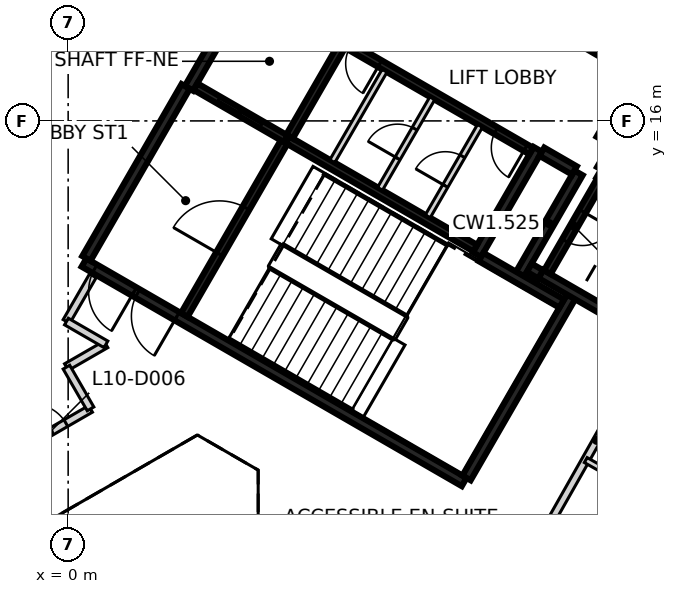
"""IFC4 building model, lengths in metres.
Left out: names, types, materials, properties, quantities, classifications, styles, units other than length and angle.
Written with IfcOpenShell. Run it as: python <this file> out.ifc"""

import sys

from ifc_helpers import new_model, si_unit, direction, frame, frame_2d, origin, place, context, subcontext, project, spatial, rectangle, extrude, element, fill, save


model = new_model("IFC4")
c1 = context("Model", 3, precision=1e-05, world=origin(), true_north=direction((0.0, 1.0)))
c2 = subcontext(c1, "Body", "Model", "MODEL_VIEW")
j1 = project(units=[si_unit("LENGTHUNIT", "METRE"), si_unit("PLANEANGLEUNIT", "RADIAN")], contexts=[c1])
p1 = place(None, origin())
s1 = spatial("IfcSite", under=j1, at=p1, CompositionType="ELEMENT")
p2 = place(p1, origin())
s2 = spatial("IfcBuilding", under=s1, at=p2, CompositionType="ELEMENT")
p3 = place(p2, frame((0.0, 0.0, 49.4)))
s3 = spatial("IfcBuildingStorey", under=s2, at=p3, CompositionType="ELEMENT", Elevation=49.4)
p4 = place(p3, frame((10.42, 6.498, 0.0), z_axis=(0.0, 0.0, 1.0), x_axis=(-0.866021906294, 0.500006057782, 0.0)))
e1 = element("IfcWall", 1, at=p4, inside=s3, PredefinedType="SHEAR", context=c2, shape_type="SweptSolid", body=[
    extrude(rectangle(XDim=11.55, YDim=0.25, at=frame_2d((5.775, 0.0))), origin(), (0.0, 0.0, 1.0), 3.125),
])
p5 = place(p4, frame((10.025, 0.0, 0.0)))
e2 = element("IfcOpeningElement", 2, at=p5, cuts=e1, PredefinedType="OPENING", context=c2, shape_type="SweptSolid", body=[
    extrude(rectangle(XDim=1.2, YDim=2.1, at=frame_2d((0.6, 1.05))), frame((0.0, 0.135, 0.0), z_axis=(0.0, -1.0, 0.0), x_axis=(1.0, 0.0, 0.0)), (0.0, 0.0, 1.0), 0.27),
])
p6 = place(p4, frame((8.725, 0.0, 0.0)))
e3 = element("IfcOpeningElement", 3, at=p6, cuts=e1, PredefinedType="OPENING", context=c2, shape_type="SweptSolid", body=[
    extrude(rectangle(XDim=1.2, YDim=2.1, at=frame_2d((0.6, 1.05))), frame((0.0, 0.135, 0.0), z_axis=(0.0, -1.0, 0.0), x_axis=(1.0, 0.0, 0.0)), (0.0, 0.0, 1.0), 0.27),
])
p7 = place(p3, frame((3.179, 16.856, 0.0), z_axis=(0.0, 0.0, 1.0), x_axis=(0.500004234368, 0.866022959057, 0.0)))
e4 = element("IfcWall", 4, at=p7, inside=s3, PredefinedType="SHEAR", context=c2, shape_type="SweptSolid", body=[
    extrude(rectangle(XDim=6.25, YDim=0.25, at=frame_2d((3.125, 0.0))), origin(), (0.0, 0.0, 1.0), 3.125),
])
p8 = place(p3, frame((0.48, 12.381, 0.0), z_axis=(0.0, 0.0, 1.0), x_axis=(0.49999885962, 0.866026062182, 0.0)))
e5 = element("IfcWall", 5, at=p8, inside=s3, PredefinedType="SHEAR", context=c2, shape_type="SweptSolid", body=[
    extrude(rectangle(XDim=5.225, YDim=0.25, at=frame_2d((2.612, 0.0))), origin(), (0.0, 0.0, 1.0), 3.125),
])
p9 = place(p3, frame((13.238, 11.378, 0.0), z_axis=(0.0, 0.0, 1.0), x_axis=(-0.500008851346, -0.866020293397, 0.0)))
e6 = element("IfcWall", 6, at=p9, inside=s3, PredefinedType="SHEAR", context=c2, shape_type="SweptSolid", body=[
    extrude(rectangle(XDim=5.51, YDim=0.25, at=frame_2d((2.755, 0.0))), origin(), (0.0, 0.0, 1.0), 3.125),
])
p10 = place(p3, frame((12.357, 15.252, 0.0), z_axis=(0.0, 0.0, 1.0), x_axis=(-0.500028443584, -0.866008981251, 0.0)))
e7 = element("IfcWall", 7, at=p10, inside=s3, PredefinedType="SHEAR", context=c2, shape_type="SweptSolid", body=[
    extrude(rectangle(XDim=3.2, YDim=0.25, at=frame_2d((1.6, 0.0))), origin(), (0.0, 0.0, 1.0), 3.125),
])
p11 = place(p3, frame((14.918, 10.54, 0.0), z_axis=(0.0, 0.0, 1.0), x_axis=(-0.866063538972, 0.499933942099, 0.0)))
e8 = element("IfcWall", 8, at=p11, inside=s3, PredefinedType="SHEAR", context=c2, shape_type="SweptSolid", body=[
    extrude(rectangle(XDim=2.865, YDim=0.25, at=frame_2d((1.432, 0.0))), origin(), (0.0, 0.0, 1.0), 3.125),
])
p12 = place(p3, frame((13.963, 14.614, 0.0), z_axis=(0.0, 0.0, 1.0), x_axis=(0.866042235819, -0.499970844928, 0.0)))
e9 = element("IfcWall", 9, at=p12, inside=s3, PredefinedType="SHEAR", context=c2, shape_type="SweptSolid", body=[
    extrude(rectangle(XDim=2.865, YDim=0.25, at=frame_2d((1.432, 0.0))), origin(), (0.0, 0.0, 1.0), 3.125),
])
p13 = place(p3, frame((11.888, 11.961, 0.0), z_axis=(0.0, 0.0, 1.0), x_axis=(0.500003324108, 0.866023484601, 0.0)))
e10 = element("IfcWall", 10, at=p13, inside=s3, PredefinedType="SHEAR", context=c2, shape_type="SweptSolid", body=[
    extrude(rectangle(XDim=3.085, YDim=0.25, at=frame_2d((1.542, 0.0))), origin(), (0.0, 0.0, 1.0), 3.125),
])
p14 = place(p3, frame((10.865, 12.418, 0.0), z_axis=(0.0, 0.0, 1.0), x_axis=(0.866026229868, -0.499998569178, 0.0)))
e11 = element("IfcWall", 11, at=p14, inside=s3, PredefinedType="SHEAR", context=c2, shape_type="SweptSolid", body=[
    extrude(rectangle(XDim=2.449, YDim=0.25, at=frame_2d((1.225, 0.0))), origin(), (0.0, 0.0, 1.0), 3.125),
])
p15 = place(p3, frame((13.297, 18.231, 0.0), z_axis=(0.0, 0.0, 1.0), x_axis=(0.866043531843, -0.499968599967, 0.0)))
e12 = element("IfcWall", 12, at=p15, inside=s3, PredefinedType="SHEAR", context=c2, shape_type="SweptSolid", body=[
    extrude(rectangle(XDim=1.975, YDim=0.25, at=frame_2d((0.987, 0.0))), origin(), (0.0, 0.0, 1.0), 3.125),
])
p16 = place(p3, frame((14.945, 17.135, 0.0), z_axis=(0.0, 0.0, 1.0), x_axis=(-0.499983108224, -0.866035156036, 0.0)))
e13 = element("IfcWall", 13, at=p16, inside=s3, PredefinedType="SHEAR", context=c2, shape_type="SweptSolid", body=[
    extrude(rectangle(XDim=1.865, YDim=0.25, at=frame_2d((0.932, 0.0))), origin(), (0.0, 0.0, 1.0), 3.125),
])
p17 = place(p16, frame((0.535, 0.0, 0.0)))
e14 = element("IfcOpeningElement", 14, at=p17, cuts=e13, PredefinedType="OPENING", context=c2, shape_type="SweptSolid", body=[
    extrude(rectangle(XDim=1.25, YDim=2.1, at=frame_2d((0.625, 1.05))), frame((0.0, 0.135, 0.0), z_axis=(0.0, -1.0, 0.0), x_axis=(1.0, 0.0, 0.0)), (0.0, 0.0, 1.0), 0.27),
])
p18 = place(p3, frame((13.322, 14.695, 0.0), z_axis=(0.0, 0.0, 1.0), x_axis=(-0.866017078145, 0.500014420154, 0.0)))
e15 = element("IfcWall", 15, at=p18, inside=s3, PredefinedType="SHEAR", context=c2, shape_type="SweptSolid", body=[
    extrude(rectangle(XDim=0.989, YDim=0.25, at=frame_2d((0.495, 0.0))), origin(), (0.0, 0.0, 1.0), 3.125),
])
p19 = place(p3, frame((14.368, 15.315, 0.0), z_axis=(0.0, 0.0, 1.0), x_axis=(-0.499897359611, -0.866084655132, 0.0)))
e16 = element("IfcWall", 16, at=p19, inside=s3, PredefinedType="SHEAR", context=c2, shape_type="SweptSolid", body=[
    extrude(rectangle(XDim=0.685, YDim=0.25, at=frame_2d((0.342, 0.0))), origin(), (0.0, 0.0, 1.0), 3.125),
])
p20 = place(p3, frame((12.433, 11.964, 0.0), z_axis=(0.0, 0.0, 1.0), x_axis=(-0.866055875208, 0.499947218231, 0.0)))
e17 = element("IfcWall", 17, at=p20, inside=s3, PredefinedType="SHEAR", context=c2, shape_type="SweptSolid", body=[
    extrude(rectangle(XDim=0.345, YDim=0.25, at=frame_2d((0.172, 0.0))), origin(), (0.0, 0.0, 1.0), 3.125),
])
p21 = place(p3, frame((5.775, 15.502, 0.0), z_axis=(0.0, 0.0, 1.0), x_axis=(0.866020080793, -0.500009219579, 0.0)))
e18 = element("IfcWall", 18, at=p21, inside=s3, PredefinedType="SHEAR", context=c2, shape_type="SweptSolid", body=[
    extrude(rectangle(XDim=5.699, YDim=0.2, at=frame_2d((2.85, 0.0))), origin(), (0.0, 0.0, 1.0), 3.125),
])
p22 = place(p3, frame((12.185, 15.207, 0.0), z_axis=(0.0, 0.0, 1.0), x_axis=(-0.866020080793, 0.500009219579, 0.0)))
e19 = element("IfcWall", 19, at=p22, inside=s3, PredefinedType="SHEAR", context=c2, shape_type="SweptSolid", body=[
    extrude(rectangle(XDim=5.699, YDim=0.2, at=frame_2d((2.85, 0.0))), origin(), (0.0, 0.0, 1.0), 3.125),
])
p23 = place(p22, frame((0.174, 0.0, 0.0)))
e20 = element("IfcOpeningElement", 20, at=p23, cuts=e19, PredefinedType="OPENING", context=c2, shape_type="SweptSolid", body=[
    extrude(rectangle(XDim=0.9, YDim=2.1, at=frame_2d((0.45, 1.05))), frame((0.0, 0.11, 0.0), z_axis=(0.0, -1.0, 0.0), x_axis=(1.0, 0.0, 0.0)), (0.0, 0.0, 1.0), 0.22),
])
p24 = place(p22, frame((4.599, 0.0, 0.0)))
e21 = element("IfcOpeningElement", 21, at=p24, cuts=e19, PredefinedType="OPENING", context=c2, shape_type="SweptSolid", body=[
    extrude(rectangle(XDim=0.9, YDim=2.1, at=frame_2d((0.45, 1.05))), frame((0.0, 0.11, 0.0), z_axis=(0.0, -1.0, 0.0), x_axis=(1.0, 0.0, 0.0)), (0.0, 0.0, 1.0), 0.22),
])
p25 = place(p3, frame((3.057, 10.895, 0.0), z_axis=(0.0, 0.0, 1.0), x_axis=(0.499989418164, 0.866031513124, 0.0)))
e22 = element("IfcWall", 22, at=p25, inside=s3, PredefinedType="SHEAR", context=c2, shape_type="SweptSolid", body=[
    extrude(rectangle(XDim=5.251, YDim=0.2, at=frame_2d((2.625, 0.0))), origin(), (0.0, 0.0, 1.0), 3.125),
])
p26 = place(p25, frame((1.849, 0.0, 0.0)))
e23 = element("IfcOpeningElement", 23, at=p26, cuts=e22, PredefinedType="OPENING", context=c2, shape_type="SweptSolid", body=[
    extrude(rectangle(XDim=1.4, YDim=2.1, at=frame_2d((0.7, 1.05))), frame((0.0, 0.11, 0.0), z_axis=(0.0, -1.0, 0.0), x_axis=(1.0, 0.0, 0.0)), (0.0, 0.0, 1.0), 0.22),
])
p27 = place(p3, frame((14.008, 14.442, 0.0), z_axis=(0.0, 0.0, 1.0), x_axis=(-0.499986818241, -0.866033014143, 0.0)))
e24 = element("IfcWall", 24, at=p27, inside=s3, PredefinedType="SHEAR", context=c2, shape_type="SweptSolid", body=[
    extrude(rectangle(XDim=2.798, YDim=0.2, at=frame_2d((1.399, 0.0))), origin(), (0.0, 0.0, 1.0), 3.125),
])
p28 = place(p27, frame((0.949, 0.0, 0.0)))
e25 = element("IfcOpeningElement", 25, at=p28, cuts=e24, PredefinedType="OPENING", context=c2, shape_type="SweptSolid", body=[
    extrude(rectangle(XDim=0.9, YDim=2.1, at=frame_2d((0.45, 1.05))), frame((0.0, 0.11, 0.0), z_axis=(0.0, -1.0, 0.0), x_axis=(1.0, 0.0, 0.0)), (0.0, 0.0, 1.0), 0.22),
])
p29 = place(p3, frame((7.199, 17.97, 0.0), z_axis=(0.0, 0.0, 1.0), x_axis=(-0.499968400327, -0.866043647095, 0.0)))
e26 = element("IfcWall", 26, at=p29, inside=s3, PredefinedType="SHEAR", context=c2, shape_type="SweptSolid", body=[
    extrude(rectangle(XDim=2.75, YDim=0.2, at=frame_2d((1.375, 0.0))), origin(), (0.0, 0.0, 1.0), 3.125),
])
p30 = place(p3, frame((5.725, 15.531, 0.0), z_axis=(0.0, 0.0, 1.0), x_axis=(-0.866037306777, 0.499979382845, 0.0)))
e27 = element("IfcWall", 27, at=p30, inside=s3, PredefinedType="SHEAR", context=c2, shape_type="SweptSolid", body=[
    extrude(rectangle(XDim=2.742, YDim=0.2, at=frame_2d((1.371, 0.0))), origin(), (0.0, 0.0, 1.0), 3.125),
])
p31 = place(p30, frame((0.743, 0.0, 0.0)))
e28 = element("IfcOpeningElement", 28, at=p31, cuts=e27, PredefinedType="OPENING", context=c2, shape_type="SweptSolid", body=[
    extrude(rectangle(XDim=1.3, YDim=2.1, at=frame_2d((0.65, 1.05))), frame((0.0, 0.11, 0.0), z_axis=(0.0, -1.0, 0.0), x_axis=(1.0, 0.0, 0.0)), (0.0, 0.0, 1.0), 0.22),
])
p32 = place(p3, frame((9.462, 13.489, 0.0), z_axis=(0.0, 0.0, 1.0), x_axis=(0.50002746344, 0.86600954718, 0.0)))
e29 = element("IfcWall", 29, at=p32, inside=s3, PredefinedType="PARTITIONING", context=c2, shape_type="SweptSolid", body=[
    extrude(rectangle(XDim=2.748, YDim=0.15, at=frame_2d((1.374, 0.0))), origin(), (0.0, 0.0, 1.0), 3.125),
])
p33 = place(p32, frame((0.924, 0.0, 0.0)))
e30 = element("IfcOpeningElement", 30, at=p33, cuts=e29, PredefinedType="OPENING", context=c2, shape_type="SweptSolid", body=[
    extrude(rectangle(XDim=0.9, YDim=2.1, at=frame_2d((0.45, 1.05))), frame((0.0, 0.085, 0.0), z_axis=(0.0, -1.0, 0.0), x_axis=(1.0, 0.0, 0.0)), (0.0, 0.0, 1.0), 0.17),
])
p34 = place(p3, frame((8.207, 14.214, 0.0), z_axis=(0.0, 0.0, 1.0), x_axis=(0.499922376475, 0.866070215109, 0.0)))
e31 = element("IfcWall", 31, at=p34, inside=s3, PredefinedType="PARTITIONING", context=c2, shape_type="SweptSolid", body=[
    extrude(rectangle(XDim=2.749, YDim=0.15, at=frame_2d((1.374, 0.0))), origin(), (0.0, 0.0, 1.0), 3.125),
])
p35 = place(p34, frame((0.924, 0.0, 0.0)))
e32 = element("IfcOpeningElement", 32, at=p35, cuts=e31, PredefinedType="OPENING", context=c2, shape_type="SweptSolid", body=[
    extrude(rectangle(XDim=0.9, YDim=2.1, at=frame_2d((0.45, 1.05))), frame((0.0, 0.085, 0.0), z_axis=(0.0, -1.0, 0.0), x_axis=(1.0, 0.0, 0.0)), (0.0, 0.0, 1.0), 0.17),
])
p36 = place(p3, frame((6.951, 14.939, 0.0), z_axis=(0.0, 0.0, 1.0), x_axis=(0.50002746344, 0.86600954718, 0.0)))
e33 = element("IfcWall", 33, at=p36, inside=s3, PredefinedType="PARTITIONING", context=c2, shape_type="SweptSolid", body=[
    extrude(rectangle(XDim=2.748, YDim=0.15, at=frame_2d((1.374, 0.0))), origin(), (0.0, 0.0, 1.0), 3.125),
])
p37 = place(p3, frame((-5.446, 4.94, 0.0), z_axis=(0.0, 0.0, 1.0), x_axis=(0.866096332545, 0.499877127655, 0.0)))
e34 = element("IfcWall", 34, at=p37, inside=s3, PredefinedType="PARTITIONING", context=c2, shape_type="SweptSolid", body=[
    extrude(rectangle(XDim=6.969, YDim=0.2, at=frame_2d((3.484, 0.0))), origin(), (0.0, 0.0, 1.0), 3.125),
])
p38 = place(p37, frame((5.219, 0.0, 0.0)))
e35 = element("IfcOpeningElement", 35, at=p38, cuts=e34, PredefinedType="OPENING", context=c2, shape_type="SweptSolid", body=[
    extrude(rectangle(XDim=1.0, YDim=2.1, at=frame_2d((0.5, 1.05))), frame((0.0, 0.11, 0.0), z_axis=(0.0, -1.0, 0.0), x_axis=(1.0, 0.0, 0.0)), (0.0, 0.0, 1.0), 0.22),
])
p39 = place(p37, frame((3.344, 0.0, 0.0)))
e36 = element("IfcOpeningElement", 36, at=p39, cuts=e34, PredefinedType="OPENING", context=c2, shape_type="SweptSolid", body=[
    extrude(rectangle(XDim=0.95, YDim=2.1, at=frame_2d((0.475, 1.05))), frame((0.0, 0.11, 0.0), z_axis=(0.0, -1.0, 0.0), x_axis=(1.0, 0.0, 0.0)), (0.0, 0.0, 1.0), 0.22),
])
p40 = place(p3, frame((-0.045, 9.522, 0.0), z_axis=(0.0, 0.0, 1.0), x_axis=(0.86625675314, 0.499599076899, 0.0)))
e37 = element("IfcWall", 37, at=p40, inside=s3, PredefinedType="PARTITIONING", context=c2, shape_type="SweptSolid", body=[
    extrude(rectangle(XDim=1.199, YDim=0.2, at=frame_2d((0.6, 0.0))), origin(), (0.0, 0.0, 1.0), 3.125),
])
p41 = place(p3, frame((-0.045, 10.722, 0.0), z_axis=(0.0, 0.0, 1.0), x_axis=(0.500107785535, 0.865963164833, 0.0)))
e38 = element("IfcWall", 38, at=p41, inside=s3, PredefinedType="PARTITIONING", context=c2, shape_type="SweptSolid", body=[
    extrude(rectangle(XDim=1.389, YDim=0.2, at=frame_2d((0.695, 0.0))), origin(), (0.0, 0.0, 1.0), 3.125),
])
p42 = place(p3, frame((-0.045, 9.521, 0.0), z_axis=(0.0, 0.0, 1.0), x_axis=(0.500094716449, -0.865970712311, 0.0)))
e39 = element("IfcWall", 39, at=p42, inside=s3, PredefinedType="PARTITIONING", context=c2, shape_type="SweptSolid", body=[
    extrude(rectangle(XDim=1.268, YDim=0.2, at=frame_2d((0.634, 0.0))), origin(), (0.0, 0.0, 1.0), 3.125),
])
p43 = place(p3, frame((-0.045, 10.721, 0.0), z_axis=(0.0, 0.0, 1.0), x_axis=(0.865992388649, -0.500057179532, 0.0)))
e40 = element("IfcWall", 40, at=p43, inside=s3, PredefinedType="PARTITIONING", context=c2, shape_type="SweptSolid", body=[
    extrude(rectangle(XDim=1.199, YDim=0.2, at=frame_2d((0.6, 0.0))), origin(), (0.0, 0.0, 1.0), 3.125),
])
p44 = place(p3, frame((12.432, 4.992, 0.0), z_axis=(0.0, 0.0, 1.0), x_axis=(0.492790102015, 0.870148214591, 0.0)))
e41 = element("IfcWall", 41, at=p44, inside=s3, PredefinedType="PARTITIONING", context=c2, shape_type="SweptSolid", body=[
    extrude(rectangle(XDim=5.981, YDim=0.2, at=frame_2d((2.991, 0.0))), origin(), (0.0, 0.0, 1.0), 3.125),
])
p45 = place(p3, frame((13.619, 7.076, 0.0), z_axis=(0.0, 0.0, 1.0), x_axis=(0.870725399165, -0.491769538758, 0.0)))
e42 = element("IfcWall", 42, at=p45, inside=s3, PredefinedType="PARTITIONING", context=c2, shape_type="SweptSolid", body=[
    extrude(rectangle(XDim=2.489, YDim=0.15, at=frame_2d((1.244, 0.0))), origin(), (0.0, 0.0, 1.0), 3.125),
])
p46 = place(p45, frame((0.845, 0.0, 0.0)))
e43 = element("IfcOpeningElement", 43, at=p46, cuts=e42, PredefinedType="OPENING", context=c2, shape_type="SweptSolid", body=[
    extrude(rectangle(XDim=0.8, YDim=2.1, at=frame_2d((0.4, 1.05))), frame((0.0, 0.085, 0.0), z_axis=(0.0, -1.0, 0.0), x_axis=(1.0, 0.0, 0.0)), (0.0, 0.0, 1.0), 0.17),
])
p47 = place(p31, origin())
e44 = element("IfcDoor", 44, at=p47, inside=s3, OperationType="SLIDING_TO_RIGHT", PredefinedType="DOOR", context=c2, shape_type="SweptSolid", body=[
    extrude(rectangle(XDim=1.3, YDim=2.1, at=frame_2d((0.65, 1.05))), frame((0.0, 0.025, 0.0), z_axis=(0.0, -1.0, 0.0), x_axis=(1.0, 0.0, 0.0)), (0.0, 0.0, 1.0), 0.05),
])
fill(e28, e44)
p48 = place(p5, origin())
e45 = element("IfcDoor", 45, at=p48, inside=s3, OperationType="SINGLE_SWING_LEFT", PredefinedType="DOOR", context=c2, shape_type="SweptSolid", body=[
    extrude(rectangle(XDim=1.2, YDim=2.1, at=frame_2d((0.6, 1.05))), frame((0.0, 0.025, 0.0), z_axis=(0.0, -1.0, 0.0), x_axis=(1.0, 0.0, 0.0)), (0.0, 0.0, 1.0), 0.05),
])
fill(e2, e45)
p49 = place(p6, origin())
e46 = element("IfcDoor", 46, at=p49, inside=s3, OperationType="SINGLE_SWING_RIGHT", PredefinedType="DOOR", context=c2, shape_type="SweptSolid", body=[
    extrude(rectangle(XDim=1.2, YDim=2.1, at=frame_2d((0.6, 1.05))), frame((0.0, 0.025, 0.0), z_axis=(0.0, -1.0, 0.0), x_axis=(1.0, 0.0, 0.0)), (0.0, 0.0, 1.0), 0.05),
])
fill(e3, e46)
p50 = place(p26, origin())
e47 = element("IfcDoor", 47, at=p50, inside=s3, OperationType="SINGLE_SWING_RIGHT", PredefinedType="DOOR", context=c2, shape_type="SweptSolid", body=[
    extrude(rectangle(XDim=1.4, YDim=2.1, at=frame_2d((0.7, 1.05))), frame((0.0, 0.025, 0.0), z_axis=(0.0, -1.0, 0.0), x_axis=(1.0, 0.0, 0.0)), (0.0, 0.0, 1.0), 0.05),
])
fill(e23, e47)
p51 = place(p23, origin())
e48 = element("IfcDoor", 48, at=p51, inside=s3, OperationType="SINGLE_SWING_LEFT", PredefinedType="DOOR", context=c2, shape_type="SweptSolid", body=[
    extrude(rectangle(XDim=0.9, YDim=2.1, at=frame_2d((0.45, 1.05))), frame((0.0, 0.025, 0.0), z_axis=(0.0, -1.0, 0.0), x_axis=(1.0, 0.0, 0.0)), (0.0, 0.0, 1.0), 0.05),
])
fill(e20, e48)
p52 = place(p33, origin())
e49 = element("IfcDoor", 49, at=p52, inside=s3, OperationType="SINGLE_SWING_RIGHT", PredefinedType="DOOR", context=c2, shape_type="SweptSolid", body=[
    extrude(rectangle(XDim=0.9, YDim=2.1, at=frame_2d((0.45, 1.05))), frame((0.0, 0.025, 0.0), z_axis=(0.0, -1.0, 0.0), x_axis=(1.0, 0.0, 0.0)), (0.0, 0.0, 1.0), 0.05),
])
fill(e30, e49)
p53 = place(p35, origin())
e50 = element("IfcDoor", 50, at=p53, inside=s3, OperationType="SINGLE_SWING_LEFT", PredefinedType="DOOR", context=c2, shape_type="SweptSolid", body=[
    extrude(rectangle(XDim=0.9, YDim=2.1, at=frame_2d((0.45, 1.05))), frame((0.0, 0.025, 0.0), z_axis=(0.0, -1.0, 0.0), x_axis=(1.0, 0.0, 0.0)), (0.0, 0.0, 1.0), 0.05),
])
fill(e32, e50)
p54 = place(p24, origin())
e51 = element("IfcDoor", 51, at=p54, inside=s3, OperationType="SINGLE_SWING_RIGHT", PredefinedType="DOOR", context=c2, shape_type="SweptSolid", body=[
    extrude(rectangle(XDim=0.9, YDim=2.1, at=frame_2d((0.45, 1.05))), frame((0.0, 0.025, 0.0), z_axis=(0.0, -1.0, 0.0), x_axis=(1.0, 0.0, 0.0)), (0.0, 0.0, 1.0), 0.05),
])
fill(e21, e51)
p55 = place(p28, origin())
e52 = element("IfcDoor", 52, at=p55, inside=s3, OperationType="SINGLE_SWING_LEFT", PredefinedType="DOOR", context=c2, shape_type="SweptSolid", body=[
    extrude(rectangle(XDim=0.9, YDim=2.1, at=frame_2d((0.45, 1.05))), frame((0.0, 0.025, 0.0), z_axis=(0.0, -1.0, 0.0), x_axis=(1.0, 0.0, 0.0)), (0.0, 0.0, 1.0), 0.05),
])
fill(e25, e52)
p56 = place(p38, origin())
e53 = element("IfcDoor", 53, at=p56, inside=s3, OperationType="SINGLE_SWING_LEFT", PredefinedType="DOOR", context=c2, shape_type="SweptSolid", body=[
    extrude(rectangle(XDim=1.0, YDim=2.1, at=frame_2d((0.5, 1.05))), frame((0.0, 0.025, 0.0), z_axis=(0.0, -1.0, 0.0), x_axis=(1.0, 0.0, 0.0)), (0.0, 0.0, 1.0), 0.05),
])
fill(e35, e53)
save(model, sys.argv[1])
